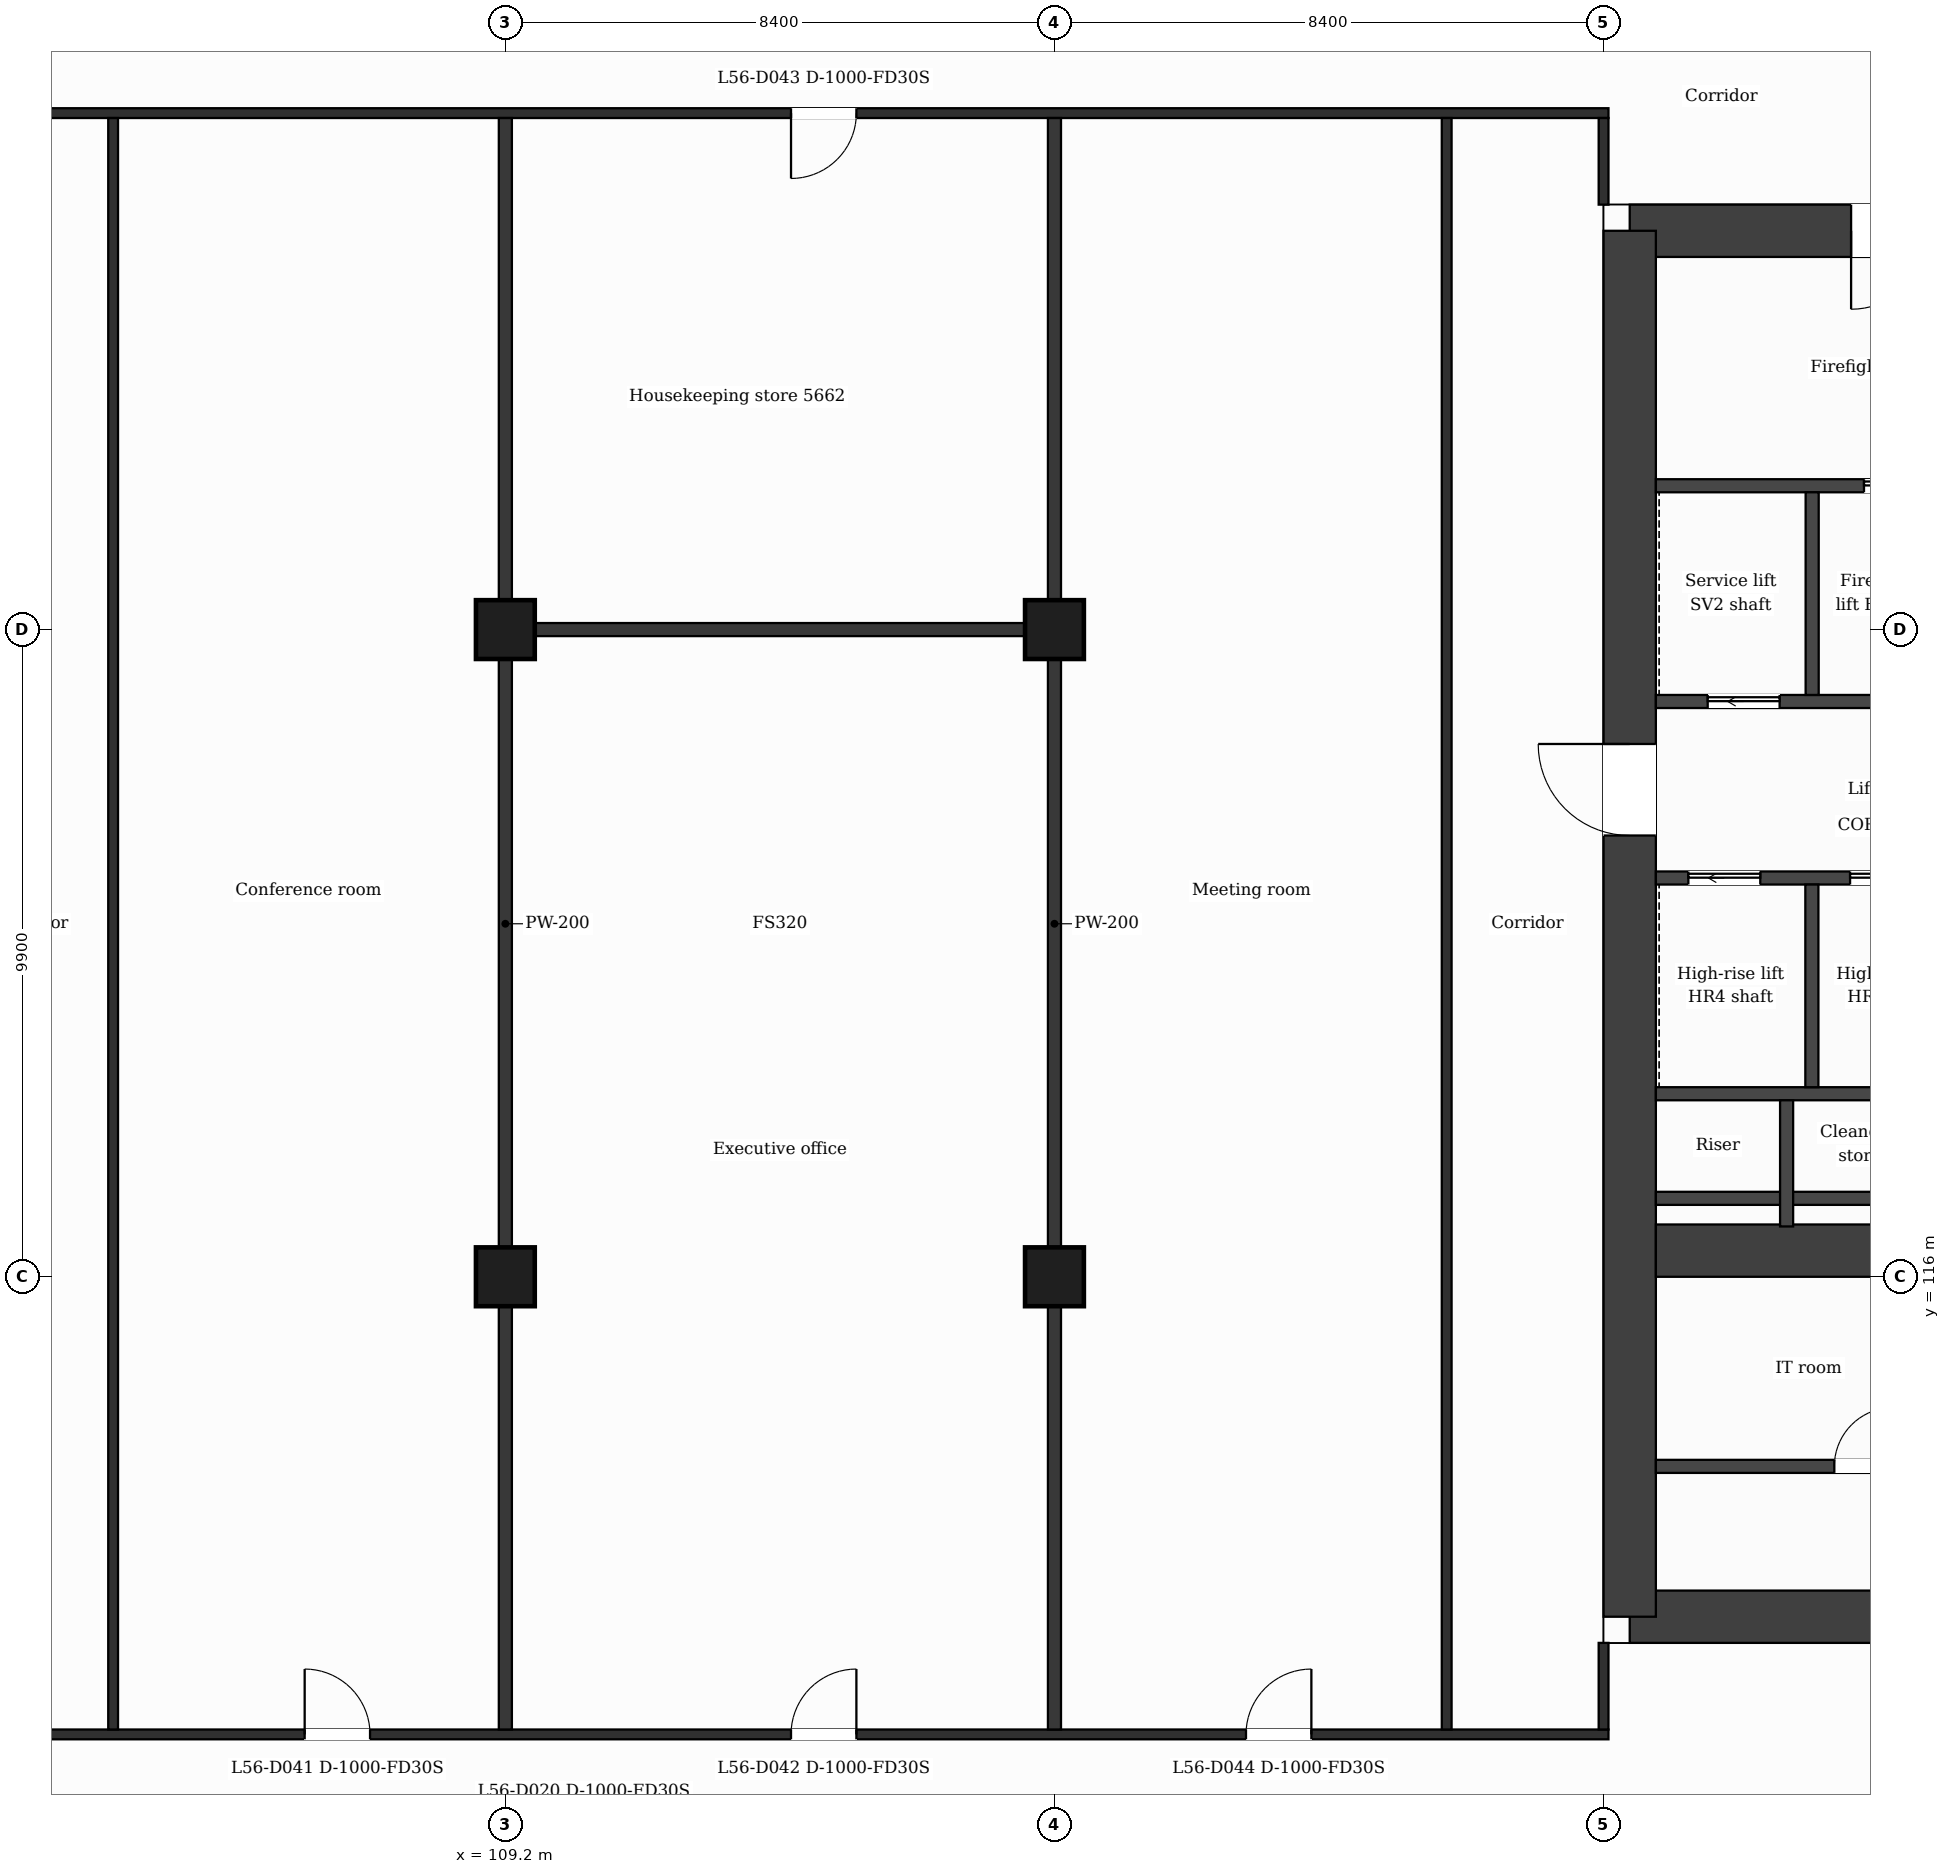
"""IFC4 building model, lengths in metres.
Left out: names, types, materials, properties, quantities, classifications, styles, units other than length and angle.
Written with IfcOpenShell. Run it as: python <this file> out.ifc"""

import sys

from ifc_helpers import new_model, si_unit, direction, frame, frame_2d, origin, origin_2d, place, context, subcontext, project, spatial, rectangle, extrude, element, fill, save


model = new_model("IFC4")
c1 = context("Model", 3, precision=1e-05, world=origin(), true_north=direction((0.0, 1.0)))
c2 = subcontext(c1, "Body", "Model", "MODEL_VIEW")
j1 = project(units=[si_unit("LENGTHUNIT", "METRE"), si_unit("PLANEANGLEUNIT", "RADIAN")], contexts=[c1])
p1 = place(None, origin())
s1 = spatial("IfcSite", under=j1, at=p1, CompositionType="ELEMENT")
p2 = place(p1, origin())
s2 = spatial("IfcBuilding", under=s1, at=p2, CompositionType="ELEMENT")
p3 = place(p2, frame((0.0, 0.0, 231.8)))
s3 = spatial("IfcBuildingStorey", under=s2, at=p3, CompositionType="ELEMENT", Elevation=231.8)
p4 = place(p3, frame((126.4, 132.0, 0.0), z_axis=(0.0, 0.0, 1.0), x_axis=(1.0, 0.0, 0.0)))
e1 = element("IfcWall", 1, at=p4, inside=s3, PredefinedType="SHEAR", context=c2, shape_type="SweptSolid", body=[
    extrude(rectangle(XDim=11.42, YDim=0.8, at=frame_2d((5.71, 0.0))), origin(), (0.0, 0.0, 1.0), 3.7),
])
p5 = place(p4, frame((3.386, 0.0, 0.0)))
e2 = element("IfcOpeningElement", 2, at=p5, cuts=e1, PredefinedType="OPENING", context=c2, shape_type="SweptSolid", body=[
    extrude(rectangle(XDim=1.2, YDim=2.1, at=frame_2d((0.6, 1.05))), frame((0.0, 0.41, 0.0), z_axis=(0.0, -1.0, 0.0), x_axis=(1.0, 0.0, 0.0)), (0.0, 0.0, 1.0), 0.82),
])
p6 = place(p3, frame((140.673, 110.8, 0.0), z_axis=(0.0, 0.0, 1.0), x_axis=(-1.0, 0.0, 0.0)))
e3 = element("IfcWall", 3, at=p6, inside=s3, PredefinedType="SHEAR", context=c2, shape_type="SweptSolid", body=[
    extrude(rectangle(XDim=14.273, YDim=0.8, at=frame_2d((7.137, 0.0))), origin(), (0.0, 0.0, 1.0), 3.7),
])
p7 = place(p6, frame((6.965, 0.0, 0.0)))
e4 = element("IfcOpeningElement", 4, at=p7, cuts=e3, PredefinedType="OPENING", context=c2, shape_type="SweptSolid", body=[
    extrude(rectangle(XDim=1.4, YDim=2.1, at=frame_2d((0.7, 1.05))), frame((0.0, 0.41, 0.0), z_axis=(0.0, -1.0, 0.0), x_axis=(1.0, 0.0, 0.0)), (0.0, 0.0, 1.0), 0.82),
])
p8 = place(p3, frame((126.4, 110.8, 0.0), z_axis=(0.0, 0.0, 1.0), x_axis=(0.0, 1.0, 0.0)))
e5 = element("IfcWall", 5, at=p8, inside=s3, PredefinedType="SHEAR", context=c2, shape_type="SweptSolid", body=[
    extrude(rectangle(XDim=21.2, YDim=0.8, at=frame_2d((10.6, 0.0))), origin(), (0.0, 0.0, 1.0), 3.7),
])
p9 = place(p8, frame((11.95, 0.0, 0.0)))
e6 = element("IfcOpeningElement", 6, at=p9, cuts=e5, PredefinedType="OPENING", context=c2, shape_type="SweptSolid", body=[
    extrude(rectangle(XDim=1.4, YDim=2.1, at=frame_2d((0.7, 1.05))), frame((0.0, 0.41, 0.0), z_axis=(0.0, -1.0, 0.0), x_axis=(1.0, 0.0, 0.0)), (0.0, 0.0, 1.0), 0.82),
])
p10 = place(p3, frame((126.8, 116.4, 0.0), z_axis=(0.0, 0.0, 1.0), x_axis=(1.0, 0.0, 0.0)))
e7 = element("IfcWall", 7, at=p10, inside=s3, PredefinedType="SHEAR", context=c2, shape_type="SweptSolid", body=[
    extrude(rectangle(XDim=5.3, YDim=0.8, at=frame_2d((2.65, 0.0))), origin(), (0.0, 0.0, 1.0), 3.7),
])
for number, where, z_axis, x_axis in (
    (8, (109.2, 116.0, 0.0), (0.0, 0.0, 1.0), (1.0, 0.0, 0.0)),
    (9, (117.6, 116.0, 0.0), (0.0, 0.0, 1.0), (1.0, 0.0, 0.0)),
    (10, (109.2, 125.9, 0.0), (0.0, 0.0, 1.0), (1.0, 0.0, 0.0)),
    (11, (117.6, 125.9, 0.0), (0.0, 0.0, 1.0), (1.0, 0.0, 0.0)),
):
    element("IfcColumn", number, at=place(p3, frame(where, z_axis=z_axis, x_axis=x_axis)), inside=s3, PredefinedType="COLUMN", context=c2, shape_type="SweptSolid", body=[
        extrude(rectangle(XDim=0.9, YDim=0.9, at=origin_2d()), origin(), (0.0, 0.0, 1.0), 3.7),
    ])
p11 = place(p3, frame((100.725, 109.0, 0.0), z_axis=(0.0, 0.0, 1.0), x_axis=(1.0, 0.0, 0.0)))
e12 = element("IfcWall", 12, at=p11, inside=s3, PredefinedType="PARTITIONING", context=c2, shape_type="SweptSolid", body=[
    extrude(rectangle(XDim=25.35, YDim=0.15, at=frame_2d((12.675, 0.0))), origin(), (0.0, 0.0, 1.0), 3.38),
])
p12 = place(p11, frame((5.405, 0.0, 0.0)))
e13 = element("IfcOpeningElement", 13, at=p12, cuts=e12, PredefinedType="OPENING", context=c2, shape_type="SweptSolid", body=[
    extrude(rectangle(XDim=1.0, YDim=2.1, at=frame_2d((0.5, 1.05))), frame((0.0, 0.085, 0.0), z_axis=(0.0, -1.0, 0.0), x_axis=(1.0, 0.0, 0.0)), (0.0, 0.0, 1.0), 0.17),
])
p13 = place(p11, frame((12.845, 0.0, 0.0)))
e14 = element("IfcOpeningElement", 14, at=p13, cuts=e12, PredefinedType="OPENING", context=c2, shape_type="SweptSolid", body=[
    extrude(rectangle(XDim=1.0, YDim=2.1, at=frame_2d((0.5, 1.05))), frame((0.0, 0.085, 0.0), z_axis=(0.0, -1.0, 0.0), x_axis=(1.0, 0.0, 0.0)), (0.0, 0.0, 1.0), 0.17),
])
p14 = place(p11, frame((19.805, 0.0, 0.0)))
e15 = element("IfcOpeningElement", 15, at=p14, cuts=e12, PredefinedType="OPENING", context=c2, shape_type="SweptSolid", body=[
    extrude(rectangle(XDim=1.0, YDim=2.1, at=frame_2d((0.5, 1.05))), frame((0.0, 0.085, 0.0), z_axis=(0.0, -1.0, 0.0), x_axis=(1.0, 0.0, 0.0)), (0.0, 0.0, 1.0), 0.17),
])
p15 = place(p3, frame((126.8, 113.1, 0.0), z_axis=(0.0, 0.0, 1.0), x_axis=(1.0, 0.0, 0.0)))
e16 = element("IfcWall", 16, at=p15, inside=s3, PredefinedType="PARTITIONING", context=c2, shape_type="SweptSolid", body=[
    extrude(rectangle(XDim=4.873, YDim=0.2, at=frame_2d((2.437, 0.0))), origin(), (0.0, 0.0, 1.0), 3.38),
])
p16 = place(p15, frame((2.73, 0.0, 0.0)))
e17 = element("IfcOpeningElement", 17, at=p16, cuts=e16, PredefinedType="OPENING", context=c2, shape_type="SweptSolid", body=[
    extrude(rectangle(XDim=0.9, YDim=2.1, at=frame_2d((0.45, 1.05))), frame((0.0, 0.11, 0.0), z_axis=(0.0, -1.0, 0.0), x_axis=(1.0, 0.0, 0.0)), (0.0, 0.0, 1.0), 0.22),
])
for number, where, z_axis, x_axis in (
    (18, (126.8, 117.2, 0.0), (0.0, 0.0, 1.0), (1.0, 0.0, 0.0)),
    (19, (126.8, 118.8, 0.0), (0.0, 0.0, 1.0), (1.0, 0.0, 0.0)),
):
    element("IfcWall", number, at=place(p3, frame(where, z_axis=z_axis, x_axis=x_axis)), inside=s3, PredefinedType="PARTITIONING", context=c2, shape_type="SweptSolid", body=[
        extrude(rectangle(XDim=4.773, YDim=0.2, at=frame_2d((2.386, 0.0))), origin(), (0.0, 0.0, 1.0), 3.38),
    ])
p17 = place(p3, frame((126.8, 122.1, 0.0), z_axis=(0.0, 0.0, 1.0), x_axis=(1.0, 0.0, 0.0)))
e20 = element("IfcWall", 20, at=p17, inside=s3, PredefinedType="PARTITIONING", context=c2, shape_type="SweptSolid", body=[
    extrude(rectangle(XDim=4.773, YDim=0.2, at=frame_2d((2.386, 0.0))), origin(), (0.0, 0.0, 1.0), 3.38),
])
p18 = place(p17, frame((2.971, 0.0, 0.0)))
e21 = element("IfcOpeningElement", 21, at=p18, cuts=e20, PredefinedType="OPENING", context=c2, shape_type="SweptSolid", body=[
    extrude(rectangle(XDim=1.1, YDim=2.1, at=frame_2d((0.55, 1.05))), frame((0.0, 0.11, 0.0), z_axis=(0.0, -1.0, 0.0), x_axis=(1.0, 0.0, 0.0)), (0.0, 0.0, 1.0), 0.22),
])
p19 = place(p17, frame((0.497, 0.0, 0.0)))
e22 = element("IfcOpeningElement", 22, at=p19, cuts=e20, PredefinedType="OPENING", context=c2, shape_type="SweptSolid", body=[
    extrude(rectangle(XDim=1.1, YDim=2.1, at=frame_2d((0.55, 1.05))), frame((0.0, 0.11, 0.0), z_axis=(0.0, -1.0, 0.0), x_axis=(1.0, 0.0, 0.0)), (0.0, 0.0, 1.0), 0.22),
])
p20 = place(p3, frame((126.8, 124.8, 0.0), z_axis=(0.0, 0.0, 1.0), x_axis=(1.0, 0.0, 0.0)))
e23 = element("IfcWall", 23, at=p20, inside=s3, PredefinedType="PARTITIONING", context=c2, shape_type="SweptSolid", body=[
    extrude(rectangle(XDim=4.782, YDim=0.2, at=frame_2d((2.391, 0.0))), origin(), (0.0, 0.0, 1.0), 3.38),
])
p21 = place(p20, frame((0.793, 0.0, 0.0)))
e24 = element("IfcOpeningElement", 24, at=p21, cuts=e23, PredefinedType="OPENING", context=c2, shape_type="SweptSolid", body=[
    extrude(rectangle(XDim=1.1, YDim=2.1, at=frame_2d((0.55, 1.05))), frame((0.0, 0.11, 0.0), z_axis=(0.0, -1.0, 0.0), x_axis=(1.0, 0.0, 0.0)), (0.0, 0.0, 1.0), 0.22),
])
p22 = place(p3, frame((109.2, 125.9, 0.0), z_axis=(0.0, 0.0, 1.0), x_axis=(1.0, 0.0, 0.0)))
e25 = element("IfcWall", 25, at=p22, inside=s3, PredefinedType="PARTITIONING", context=c2, shape_type="SweptSolid", body=[
    extrude(rectangle(XDim=8.4, YDim=0.2, at=frame_2d((4.2, 0.0))), origin(), (0.0, 0.0, 1.0), 3.38),
])
p23 = place(p3, frame((126.8, 128.1, 0.0), z_axis=(0.0, 0.0, 1.0), x_axis=(1.0, 0.0, 0.0)))
e26 = element("IfcWall", 26, at=p23, inside=s3, PredefinedType="PARTITIONING", context=c2, shape_type="SweptSolid", body=[
    extrude(rectangle(XDim=4.782, YDim=0.2, at=frame_2d((2.391, 0.0))), origin(), (0.0, 0.0, 1.0), 3.38),
])
p24 = place(p23, frame((3.184, 0.0, 0.0)))
e27 = element("IfcOpeningElement", 27, at=p24, cuts=e26, PredefinedType="OPENING", context=c2, shape_type="SweptSolid", body=[
    extrude(rectangle(XDim=1.1, YDim=2.1, at=frame_2d((0.55, 1.05))), frame((0.0, 0.11, 0.0), z_axis=(0.0, -1.0, 0.0), x_axis=(1.0, 0.0, 0.0)), (0.0, 0.0, 1.0), 0.22),
])
p25 = place(p3, frame((100.725, 133.8, 0.0), z_axis=(0.0, 0.0, 1.0), x_axis=(1.0, 0.0, 0.0)))
e28 = element("IfcWall", 28, at=p25, inside=s3, PredefinedType="PARTITIONING", context=c2, shape_type="SweptSolid", body=[
    extrude(rectangle(XDim=25.35, YDim=0.15, at=frame_2d((12.675, 0.0))), origin(), (0.0, 0.0, 1.0), 3.38),
])
p26 = place(p25, frame((12.845, 0.0, 0.0)))
e29 = element("IfcOpeningElement", 29, at=p26, cuts=e28, PredefinedType="OPENING", context=c2, shape_type="SweptSolid", body=[
    extrude(rectangle(XDim=1.0, YDim=2.1, at=frame_2d((0.5, 1.05))), frame((0.0, 0.085, 0.0), z_axis=(0.0, -1.0, 0.0), x_axis=(1.0, 0.0, 0.0)), (0.0, 0.0, 1.0), 0.17),
])
p27 = place(p3, frame((103.2, 109.075, 0.0), z_axis=(0.0, 0.0, 1.0), x_axis=(0.0, 1.0, 0.0)))
e30 = element("IfcWall", 30, at=p27, inside=s3, PredefinedType="PARTITIONING", context=c2, shape_type="SweptSolid", body=[
    extrude(rectangle(XDim=24.65, YDim=0.15, at=frame_2d((12.325, 0.0))), origin(), (0.0, 0.0, 1.0), 3.38),
])
for number, where, z_axis, x_axis in (
    (31, (109.2, 109.075, 0.0), (0.0, 0.0, 1.0), (0.0, 1.0, 0.0)),
    (32, (117.6, 109.075, 0.0), (0.0, 0.0, 1.0), (0.0, 1.0, 0.0)),
):
    element("IfcWall", number, at=place(p3, frame(where, z_axis=z_axis, x_axis=x_axis)), inside=s3, PredefinedType="PARTITIONING", context=c2, shape_type="SweptSolid", body=[
        extrude(rectangle(XDim=24.65, YDim=0.2, at=frame_2d((12.325, 0.0))), origin(), (0.0, 0.0, 1.0), 3.38),
    ])
p28 = place(p3, frame((123.6, 109.075, 0.0), z_axis=(0.0, 0.0, 1.0), x_axis=(0.0, 1.0, 0.0)))
e33 = element("IfcWall", 33, at=p28, inside=s3, PredefinedType="PARTITIONING", context=c2, shape_type="SweptSolid", body=[
    extrude(rectangle(XDim=24.65, YDim=0.15, at=frame_2d((12.325, 0.0))), origin(), (0.0, 0.0, 1.0), 3.38),
])
p29 = place(p3, frame((126.0, 109.075, 0.0), z_axis=(0.0, 0.0, 1.0), x_axis=(0.0, 1.0, 0.0)))
e34 = element("IfcWall", 34, at=p29, inside=s3, PredefinedType="PARTITIONING", context=c2, shape_type="SweptSolid", body=[
    extrude(rectangle(XDim=1.325, YDim=0.15, at=frame_2d((0.663, 0.0))), origin(), (0.0, 0.0, 1.0), 3.38),
])
p30 = place(p3, frame((126.0, 132.4, 0.0), z_axis=(0.0, 0.0, 1.0), x_axis=(0.0, 1.0, 0.0)))
e35 = element("IfcWall", 35, at=p30, inside=s3, PredefinedType="PARTITIONING", context=c2, shape_type="SweptSolid", body=[
    extrude(rectangle(XDim=1.325, YDim=0.15, at=frame_2d((0.663, 0.0))), origin(), (0.0, 0.0, 1.0), 3.38),
])
p31 = place(p3, frame((128.8, 116.77, 0.0), z_axis=(0.0, 0.0, 1.0), x_axis=(0.0, 1.0, 0.0)))
e36 = element("IfcWall", 36, at=p31, inside=s3, PredefinedType="PARTITIONING", context=c2, shape_type="SweptSolid", body=[
    extrude(rectangle(XDim=1.93, YDim=0.2, at=frame_2d((0.965, 0.0))), origin(), (0.0, 0.0, 1.0), 3.38),
])
for number, where, z_axis, x_axis in (
    (37, (129.187, 118.9, 0.0), (0.0, 0.0, 1.0), (0.0, 1.0, 0.0)),
    (38, (129.191, 124.9, 0.0), (0.0, 0.0, 1.0), (0.0, 1.0, 0.0)),
):
    element("IfcWall", number, at=place(p3, frame(where, z_axis=z_axis, x_axis=x_axis)), inside=s3, PredefinedType="PARTITIONING", context=c2, shape_type="SweptSolid", body=[
        extrude(rectangle(XDim=3.1, YDim=0.2, at=frame_2d((1.55, 0.0))), origin(), (0.0, 0.0, 1.0), 3.38),
    ])
p32 = place(p18, origin())
e39 = element("IfcDoor", 39, at=p32, inside=s3, OperationType="SLIDING_TO_LEFT", PredefinedType="DOOR", context=c2, shape_type="SweptSolid", body=[
    extrude(rectangle(XDim=1.1, YDim=2.1, at=frame_2d((0.55, 1.05))), frame((0.0, 0.025, 0.0), z_axis=(0.0, -1.0, 0.0), x_axis=(1.0, 0.0, 0.0)), (0.0, 0.0, 1.0), 0.05),
])
fill(e21, e39)
p33 = place(p19, origin())
e40 = element("IfcDoor", 40, at=p33, inside=s3, OperationType="SLIDING_TO_LEFT", PredefinedType="DOOR", context=c2, shape_type="SweptSolid", body=[
    extrude(rectangle(XDim=1.1, YDim=2.1, at=frame_2d((0.55, 1.05))), frame((0.0, 0.025, 0.0), z_axis=(0.0, -1.0, 0.0), x_axis=(1.0, 0.0, 0.0)), (0.0, 0.0, 1.0), 0.05),
])
fill(e22, e40)
p34 = place(p24, origin())
e41 = element("IfcDoor", 41, at=p34, inside=s3, OperationType="SLIDING_TO_LEFT", PredefinedType="DOOR", context=c2, shape_type="SweptSolid", body=[
    extrude(rectangle(XDim=1.1, YDim=2.1, at=frame_2d((0.55, 1.05))), frame((0.0, 0.025, 0.0), z_axis=(0.0, -1.0, 0.0), x_axis=(1.0, 0.0, 0.0)), (0.0, 0.0, 1.0), 0.05),
])
fill(e27, e41)
p35 = place(p21, origin())
e42 = element("IfcDoor", 42, at=p35, inside=s3, OperationType="SLIDING_TO_LEFT", PredefinedType="DOOR", context=c2, shape_type="SweptSolid", body=[
    extrude(rectangle(XDim=1.1, YDim=2.1, at=frame_2d((0.55, 1.05))), frame((0.0, 0.025, 0.0), z_axis=(0.0, -1.0, 0.0), x_axis=(1.0, 0.0, 0.0)), (0.0, 0.0, 1.0), 0.05),
])
fill(e24, e42)
p36 = place(p16, origin())
e43 = element("IfcDoor", 43, at=p36, inside=s3, OperationType="SINGLE_SWING_RIGHT", PredefinedType="DOOR", context=c2, shape_type="SweptSolid", body=[
    extrude(rectangle(XDim=0.9, YDim=2.1, at=frame_2d((0.45, 1.05))), frame((0.0, 0.025, 0.0), z_axis=(0.0, -1.0, 0.0), x_axis=(1.0, 0.0, 0.0)), (0.0, 0.0, 1.0), 0.05),
])
fill(e17, e43)
p37 = place(p12, origin())
e44 = element("IfcDoor", 44, at=p37, inside=s3, OperationType="SINGLE_SWING_LEFT", PredefinedType="DOOR", context=c2, shape_type="SweptSolid", body=[
    extrude(rectangle(XDim=1.0, YDim=2.1, at=frame_2d((0.5, 1.05))), frame((0.0, 0.025, 0.0), z_axis=(0.0, -1.0, 0.0), x_axis=(1.0, 0.0, 0.0)), (0.0, 0.0, 1.0), 0.05),
])
fill(e13, e44)
p38 = place(p13, origin())
e45 = element("IfcDoor", 45, at=p38, inside=s3, OperationType="SINGLE_SWING_RIGHT", PredefinedType="DOOR", context=c2, shape_type="SweptSolid", body=[
    extrude(rectangle(XDim=1.0, YDim=2.1, at=frame_2d((0.5, 1.05))), frame((0.0, 0.025, 0.0), z_axis=(0.0, -1.0, 0.0), x_axis=(1.0, 0.0, 0.0)), (0.0, 0.0, 1.0), 0.05),
])
fill(e14, e45)
p39 = place(p26, origin())
e46 = element("IfcDoor", 46, at=p39, inside=s3, OperationType="SINGLE_SWING_LEFT", PredefinedType="DOOR", context=c2, shape_type="SweptSolid", body=[
    extrude(rectangle(XDim=1.0, YDim=2.1, at=frame_2d((0.5, 1.05))), frame((0.0, 0.025, 0.0), z_axis=(0.0, -1.0, 0.0), x_axis=(1.0, 0.0, 0.0)), (0.0, 0.0, 1.0), 0.05),
])
fill(e29, e46)
p40 = place(p14, origin())
e47 = element("IfcDoor", 47, at=p40, inside=s3, OperationType="SINGLE_SWING_RIGHT", PredefinedType="DOOR", context=c2, shape_type="SweptSolid", body=[
    extrude(rectangle(XDim=1.0, YDim=2.1, at=frame_2d((0.5, 1.05))), frame((0.0, 0.025, 0.0), z_axis=(0.0, -1.0, 0.0), x_axis=(1.0, 0.0, 0.0)), (0.0, 0.0, 1.0), 0.05),
])
fill(e15, e47)
p41 = place(p5, origin())
e48 = element("IfcDoor", 48, at=p41, inside=s3, OperationType="SINGLE_SWING_LEFT", PredefinedType="DOOR", context=c2, shape_type="SweptSolid", body=[
    extrude(rectangle(XDim=1.2, YDim=2.1, at=frame_2d((0.6, 1.05))), frame((0.0, 0.025, 0.0), z_axis=(0.0, -1.0, 0.0), x_axis=(1.0, 0.0, 0.0)), (0.0, 0.0, 1.0), 0.05),
])
fill(e2, e48)
p42 = place(p9, origin())
e49 = element("IfcDoor", 49, at=p42, inside=s3, OperationType="SINGLE_SWING_RIGHT", PredefinedType="DOOR", context=c2, shape_type="SweptSolid", body=[
    extrude(rectangle(XDim=1.4, YDim=2.1, at=frame_2d((0.7, 1.05))), frame((0.0, 0.025, 0.0), z_axis=(0.0, -1.0, 0.0), x_axis=(1.0, 0.0, 0.0)), (0.0, 0.0, 1.0), 0.05),
])
fill(e6, e49)
save(model, sys.argv[1])
